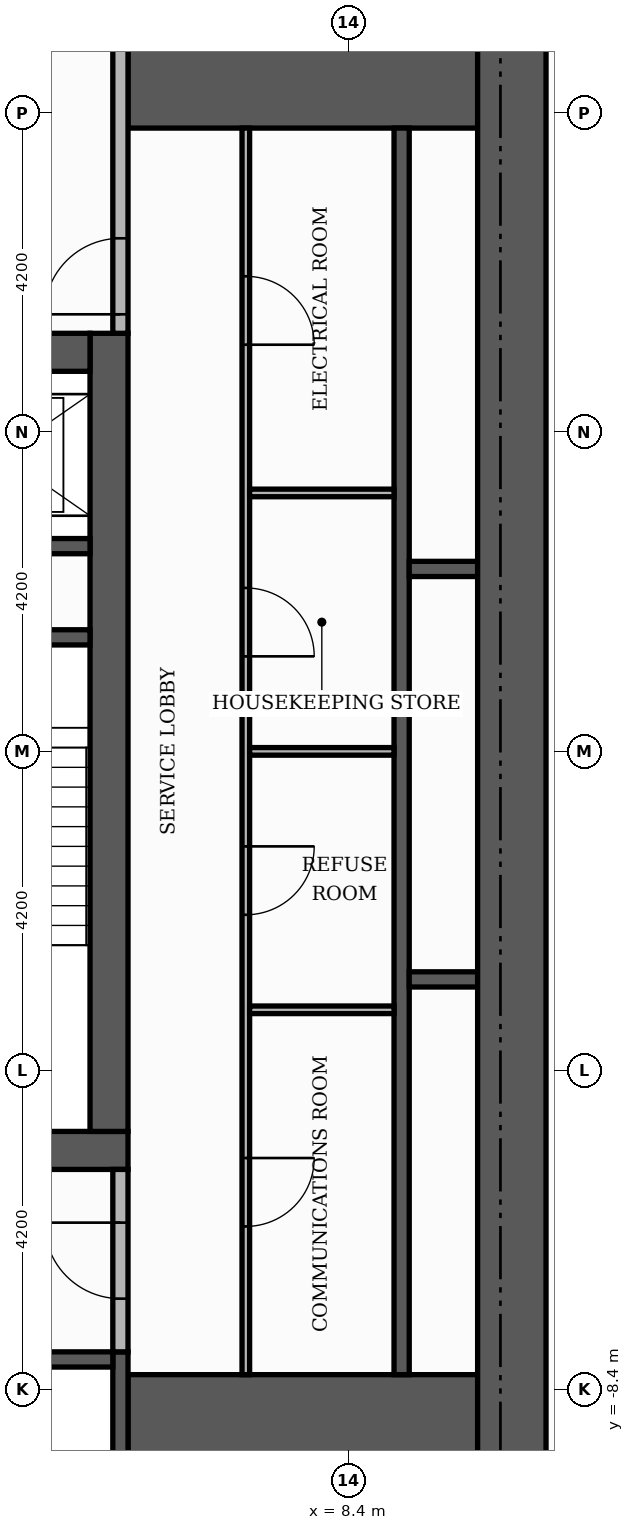
"""IFC4 building model, lengths in metres.
Left out: names, types, materials, properties, quantities, classifications, styles, units other than length and angle.
Written with IfcOpenShell. Run it as: python <this file> out.ifc"""

import sys

from ifc_helpers import new_model, si_unit, direction, frame, frame_2d, origin, place, context, subcontext, project, spatial, rectangle, extrude, element, fill, save


model = new_model("IFC4")
c1 = context("Model", 3, precision=1e-05, world=origin(), true_north=direction((0.0, 1.0)))
c2 = subcontext(c1, "Body", "Model", "MODEL_VIEW")
j1 = project(units=[si_unit("LENGTHUNIT", "METRE"), si_unit("PLANEANGLEUNIT", "RADIAN")], contexts=[c1])
p1 = place(None, origin())
s1 = spatial("IfcSite", under=j1, at=p1, CompositionType="ELEMENT")
p2 = place(p1, origin())
s2 = spatial("IfcBuilding", under=s1, at=p2, CompositionType="ELEMENT")
p3 = place(p2, frame((0.0, 0.0, 69.9)))
s3 = spatial("IfcBuildingStorey", under=s2, at=p3, CompositionType="ELEMENT", Elevation=69.9)
p4 = place(p3, frame((-5.5, -5.25, 0.0), z_axis=(0.0, 0.0, 1.0), x_axis=(1.0, 0.0, 0.0)))
e1 = element("IfcWall", 1, at=p4, inside=s3, PredefinedType="SHEAR", context=c2, shape_type="SweptSolid", body=[
    extrude(rectangle(XDim=11.0, YDim=0.5, at=frame_2d((5.5, 0.0))), origin(), (0.0, 0.0, 1.0), 3.4),
])
p5 = place(p4, frame((4.9, 0.0, 0.0)))
e2 = element("IfcOpeningElement", 2, at=p5, cuts=e1, PredefinedType="OPENING", context=c2, shape_type="SweptSolid", body=[
    extrude(rectangle(XDim=1.2, YDim=2.1, at=frame_2d((0.6, 1.05))), frame((0.0, 0.26, 0.0), z_axis=(0.0, -1.0, 0.0), x_axis=(1.0, 0.0, 0.0)), (0.0, 0.0, 1.0), 0.52),
])
p6 = place(p3, frame((5.25, -5.0, 0.0), z_axis=(0.0, 0.0, 1.0), x_axis=(0.0, 1.0, 0.0)))
e3 = element("IfcWall", 3, at=p6, inside=s3, PredefinedType="SHEAR", context=c2, shape_type="SweptSolid", body=[
    extrude(rectangle(XDim=10.5, YDim=0.5, at=frame_2d((5.25, 0.0))), origin(), (0.0, 0.0, 1.0), 3.4),
])
p7 = place(p3, frame((-5.0, 5.25, 0.0), z_axis=(0.0, 0.0, 1.0), x_axis=(1.0, 0.0, 0.0)))
e4 = element("IfcWall", 4, at=p7, inside=s3, PredefinedType="SHEAR", context=c2, shape_type="SweptSolid", body=[
    extrude(rectangle(XDim=10.0, YDim=0.5, at=frame_2d((5.0, 0.0))), origin(), (0.0, 0.0, 1.0), 3.4),
])
p8 = place(p7, frame((4.4, 0.0, 0.0)))
e5 = element("IfcOpeningElement", 5, at=p8, cuts=e4, PredefinedType="OPENING", context=c2, shape_type="SweptSolid", body=[
    extrude(rectangle(XDim=1.2, YDim=2.1, at=frame_2d((0.6, 1.05))), frame((0.0, 0.26, 0.0), z_axis=(0.0, -1.0, 0.0), x_axis=(1.0, 0.0, 0.0)), (0.0, 0.0, 1.0), 0.52),
])
for number, where, z_axis, x_axis in (
    (6, (5.5, -9.15, 0.0), (0.0, 0.0, 1.0), (1.0, 0.0, 0.0)),
    (7, (5.5, 9.15, 0.0), (0.0, 0.0, 1.0), (1.0, 0.0, 0.0)),
):
    element("IfcWall", number, at=place(p3, frame(where, z_axis=z_axis, x_axis=x_axis)), inside=s3, PredefinedType="SHEAR", context=c2, shape_type="SweptSolid", body=[
        extrude(rectangle(XDim=4.6, YDim=1.9, at=frame_2d((2.3, 0.0))), origin(), (0.0, 0.0, 1.0), 3.4),
    ])
p9 = place(p3, frame((2.15, 1.5, 0.0), z_axis=(0.0, 0.0, 1.0), x_axis=(1.0, 0.0, 0.0)))
e8 = element("IfcWall", 8, at=p9, inside=s3, PredefinedType="SHEAR", context=c2, shape_type="SweptSolid", body=[
    extrude(rectangle(XDim=2.85, YDim=0.2, at=frame_2d((1.425, 0.0))), origin(), (0.0, 0.0, 1.0), 3.4),
])
p10 = place(p3, frame((5.4, -10.1, 0.0), z_axis=(0.0, 0.0, 1.0), x_axis=(0.0, 1.0, 0.0)))
e9 = element("IfcWall", 9, at=p10, inside=s3, PredefinedType="SHEAR", context=c2, shape_type="SweptSolid", body=[
    extrude(rectangle(XDim=2.2, YDim=0.2, at=frame_2d((1.1, 0.0))), origin(), (0.0, 0.0, 1.0), 3.4),
])
p11 = place(p3, frame((9.1, -8.2, 0.0), z_axis=(0.0, 0.0, 1.0), x_axis=(0.0, 1.0, 0.0)))
e10 = element("IfcWall", 10, at=p11, inside=s3, PredefinedType="SHEAR", context=c2, shape_type="SweptSolid", body=[
    extrude(rectangle(XDim=16.4, YDim=0.2, at=frame_2d((8.2, 0.0))), origin(), (0.0, 0.0, 1.0), 3.4),
])
p12 = place(p3, frame((2.8, -8.0, 0.0), z_axis=(0.0, 0.0, 1.0), x_axis=(1.0, 0.0, 0.0)))
e11 = element("IfcWall", 11, at=p12, inside=s3, PredefinedType="SHEAR", context=c2, shape_type="SweptSolid", body=[
    extrude(rectangle(XDim=2.5, YDim=0.2, at=frame_2d((1.25, 0.0))), origin(), (0.0, 0.0, 1.0), 3.4),
])
for number, where, z_axis, x_axis in (
    (12, (9.2, -3.0, 0.0), (0.0, 0.0, 1.0), (1.0, 0.0, 0.0)),
    (13, (9.2, 2.4, 0.0), (0.0, 0.0, 1.0), (1.0, 0.0, 0.0)),
):
    element("IfcWall", number, at=place(p3, frame(where, z_axis=z_axis, x_axis=x_axis)), inside=s3, PredefinedType="SHEAR", context=c2, shape_type="SweptSolid", body=[
        extrude(rectangle(XDim=0.9, YDim=0.2, at=frame_2d((0.45, 0.0))), origin(), (0.0, 0.0, 1.0), 3.4),
    ])
p13 = place(p3, frame((2.15, 2.7, 0.0), z_axis=(0.0, 0.0, 1.0), x_axis=(1.0, 0.0, 0.0)))
e14 = element("IfcWall", 14, at=p13, inside=s3, PredefinedType="SHEAR", context=c2, shape_type="SweptSolid", body=[
    extrude(rectangle(XDim=2.85, YDim=0.2, at=frame_2d((1.425, 0.0))), origin(), (0.0, 0.0, 1.0), 3.4),
])
p14 = place(p3, frame((10.55, -10.1, 0.0), z_axis=(0.0, 0.0, 1.0), x_axis=(0.0, 1.0, 0.0)))
e15 = element("IfcWall", 15, at=p14, inside=s3, PredefinedType="SHEAR", context=c2, shape_type="SweptSolid", body=[
    extrude(rectangle(XDim=20.2, YDim=0.9, at=frame_2d((10.1, 0.0))), origin(), (0.0, 0.0, 1.0), 3.4),
])
p15 = place(p3, frame((7.05, -8.2, 0.0), z_axis=(0.0, 0.0, 1.0), x_axis=(0.0, 1.0, 0.0)))
e16 = element("IfcWall", 16, at=p15, inside=s3, PredefinedType="PARTITIONING", context=c2, shape_type="SweptSolid", body=[
    extrude(rectangle(XDim=16.4, YDim=0.1, at=frame_2d((8.2, 0.0))), origin(), (0.0, 0.0, 1.0), 3.4),
])
p16 = place(p15, frame((1.95, 0.0, 0.0)))
e17 = element("IfcOpeningElement", 17, at=p16, cuts=e16, PredefinedType="OPENING", context=c2, shape_type="SweptSolid", body=[
    extrude(rectangle(XDim=0.9, YDim=2.1, at=frame_2d((0.45, 1.05))), frame((0.0, 0.06, 0.0), z_axis=(0.0, -1.0, 0.0), x_axis=(1.0, 0.0, 0.0)), (0.0, 0.0, 1.0), 0.12),
])
p17 = place(p15, frame((6.05, 0.0, 0.0)))
e18 = element("IfcOpeningElement", 18, at=p17, cuts=e16, PredefinedType="OPENING", context=c2, shape_type="SweptSolid", body=[
    extrude(rectangle(XDim=0.9, YDim=2.1, at=frame_2d((0.45, 1.05))), frame((0.0, 0.06, 0.0), z_axis=(0.0, -1.0, 0.0), x_axis=(1.0, 0.0, 0.0)), (0.0, 0.0, 1.0), 0.12),
])
p18 = place(p15, frame((9.45, 0.0, 0.0)))
e19 = element("IfcOpeningElement", 19, at=p18, cuts=e16, PredefinedType="OPENING", context=c2, shape_type="SweptSolid", body=[
    extrude(rectangle(XDim=0.9, YDim=2.1, at=frame_2d((0.45, 1.05))), frame((0.0, 0.06, 0.0), z_axis=(0.0, -1.0, 0.0), x_axis=(1.0, 0.0, 0.0)), (0.0, 0.0, 1.0), 0.12),
])
p19 = place(p15, frame((13.55, 0.0, 0.0)))
e20 = element("IfcOpeningElement", 20, at=p19, cuts=e16, PredefinedType="OPENING", context=c2, shape_type="SweptSolid", body=[
    extrude(rectangle(XDim=0.9, YDim=2.1, at=frame_2d((0.45, 1.05))), frame((0.0, 0.06, 0.0), z_axis=(0.0, -1.0, 0.0), x_axis=(1.0, 0.0, 0.0)), (0.0, 0.0, 1.0), 0.12),
])
p20 = place(p3, frame((5.4, -7.9, 0.0), z_axis=(0.0, 0.0, 1.0), x_axis=(0.0, 1.0, 0.0)))
e21 = element("IfcWall", 21, at=p20, inside=s3, PredefinedType="PARTITIONING", context=c2, shape_type="SweptSolid", body=[
    extrude(rectangle(XDim=2.4, YDim=0.2, at=frame_2d((1.2, 0.0))), origin(), (0.0, 0.0, 1.0), 3.4),
])
p21 = place(p20, frame((0.7, 0.0, 0.0)))
e22 = element("IfcOpeningElement", 22, at=p21, cuts=e21, PredefinedType="OPENING", context=c2, shape_type="SweptSolid", body=[
    extrude(rectangle(XDim=1.0, YDim=2.1, at=frame_2d((0.5, 1.05))), frame((0.0, 0.11, 0.0), z_axis=(0.0, -1.0, 0.0), x_axis=(1.0, 0.0, 0.0)), (0.0, 0.0, 1.0), 0.22),
])
for number, where, z_axis, x_axis in (
    (23, (7.1, -3.4, 0.0), (0.0, 0.0, 1.0), (1.0, 0.0, 0.0)),
    (24, (7.1, 0.0, 0.0), (0.0, 0.0, 1.0), (1.0, 0.0, 0.0)),
    (25, (7.1, 3.4, 0.0), (0.0, 0.0, 1.0), (1.0, 0.0, 0.0)),
):
    element("IfcWall", number, at=place(p3, frame(where, z_axis=z_axis, x_axis=x_axis)), inside=s3, PredefinedType="PARTITIONING", context=c2, shape_type="SweptSolid", body=[
        extrude(rectangle(XDim=1.9, YDim=0.1, at=frame_2d((0.95, 0.0))), origin(), (0.0, 0.0, 1.0), 3.4),
    ])
p22 = place(p3, frame((5.4, 5.5, 0.0), z_axis=(0.0, 0.0, 1.0), x_axis=(0.0, 1.0, 0.0)))
e26 = element("IfcWall", 26, at=p22, inside=s3, PredefinedType="PARTITIONING", context=c2, shape_type="SweptSolid", body=[
    extrude(rectangle(XDim=4.6, YDim=0.2, at=frame_2d((2.3, 0.0))), origin(), (0.0, 0.0, 1.0), 3.4),
])
p23 = place(p22, frame((0.25, 0.0, 0.0)))
e27 = element("IfcOpeningElement", 27, at=p23, cuts=e26, PredefinedType="OPENING", context=c2, shape_type="SweptSolid", body=[
    extrude(rectangle(XDim=1.0, YDim=2.1, at=frame_2d((0.5, 1.05))), frame((0.0, 0.11, 0.0), z_axis=(0.0, -1.0, 0.0), x_axis=(1.0, 0.0, 0.0)), (0.0, 0.0, 1.0), 0.22),
])
p24 = place(p23, origin())
e28 = element("IfcDoor", 28, at=p24, inside=s3, OperationType="SINGLE_SWING_LEFT", PredefinedType="DOOR", context=c2, shape_type="SweptSolid", body=[
    extrude(rectangle(XDim=1.0, YDim=2.1, at=frame_2d((0.5, 1.05))), frame((0.0, 0.025, 0.0), z_axis=(0.0, -1.0, 0.0), x_axis=(1.0, 0.0, 0.0)), (0.0, 0.0, 1.0), 0.05),
])
fill(e27, e28)
p25 = place(p21, origin())
e29 = element("IfcDoor", 29, at=p25, inside=s3, OperationType="SINGLE_SWING_RIGHT", PredefinedType="DOOR", context=c2, shape_type="SweptSolid", body=[
    extrude(rectangle(XDim=1.0, YDim=2.1, at=frame_2d((0.5, 1.05))), frame((0.0, 0.025, 0.0), z_axis=(0.0, -1.0, 0.0), x_axis=(1.0, 0.0, 0.0)), (0.0, 0.0, 1.0), 0.05),
])
fill(e22, e29)
p26 = place(p16, frame((0.9, 0.0, 0.0), z_axis=(0.0, 0.0, 1.0), x_axis=(-1.0, 0.0, 0.0)))
e30 = element("IfcDoor", 30, at=p26, inside=s3, OperationType="SINGLE_SWING_RIGHT", PredefinedType="DOOR", context=c2, shape_type="SweptSolid", body=[
    extrude(rectangle(XDim=0.9, YDim=2.1, at=frame_2d((0.45, 1.05))), frame((0.0, 0.025, 0.0), z_axis=(0.0, -1.0, 0.0), x_axis=(1.0, 0.0, 0.0)), (0.0, 0.0, 1.0), 0.05),
])
fill(e17, e30)
p27 = place(p17, frame((0.9, 0.0, 0.0), z_axis=(0.0, 0.0, 1.0), x_axis=(-1.0, 0.0, 0.0)))
e31 = element("IfcDoor", 31, at=p27, inside=s3, OperationType="SINGLE_SWING_RIGHT", PredefinedType="DOOR", context=c2, shape_type="SweptSolid", body=[
    extrude(rectangle(XDim=0.9, YDim=2.1, at=frame_2d((0.45, 1.05))), frame((0.0, 0.025, 0.0), z_axis=(0.0, -1.0, 0.0), x_axis=(1.0, 0.0, 0.0)), (0.0, 0.0, 1.0), 0.05),
])
fill(e18, e31)
p28 = place(p18, frame((0.9, 0.0, 0.0), z_axis=(0.0, 0.0, 1.0), x_axis=(-1.0, 0.0, 0.0)))
e32 = element("IfcDoor", 32, at=p28, inside=s3, OperationType="SINGLE_SWING_LEFT", PredefinedType="DOOR", context=c2, shape_type="SweptSolid", body=[
    extrude(rectangle(XDim=0.9, YDim=2.1, at=frame_2d((0.45, 1.05))), frame((0.0, 0.025, 0.0), z_axis=(0.0, -1.0, 0.0), x_axis=(1.0, 0.0, 0.0)), (0.0, 0.0, 1.0), 0.05),
])
fill(e19, e32)
p29 = place(p19, frame((0.9, 0.0, 0.0), z_axis=(0.0, 0.0, 1.0), x_axis=(-1.0, 0.0, 0.0)))
e33 = element("IfcDoor", 33, at=p29, inside=s3, OperationType="SINGLE_SWING_LEFT", PredefinedType="DOOR", context=c2, shape_type="SweptSolid", body=[
    extrude(rectangle(XDim=0.9, YDim=2.1, at=frame_2d((0.45, 1.05))), frame((0.0, 0.025, 0.0), z_axis=(0.0, -1.0, 0.0), x_axis=(1.0, 0.0, 0.0)), (0.0, 0.0, 1.0), 0.05),
])
fill(e20, e33)
save(model, sys.argv[1])
